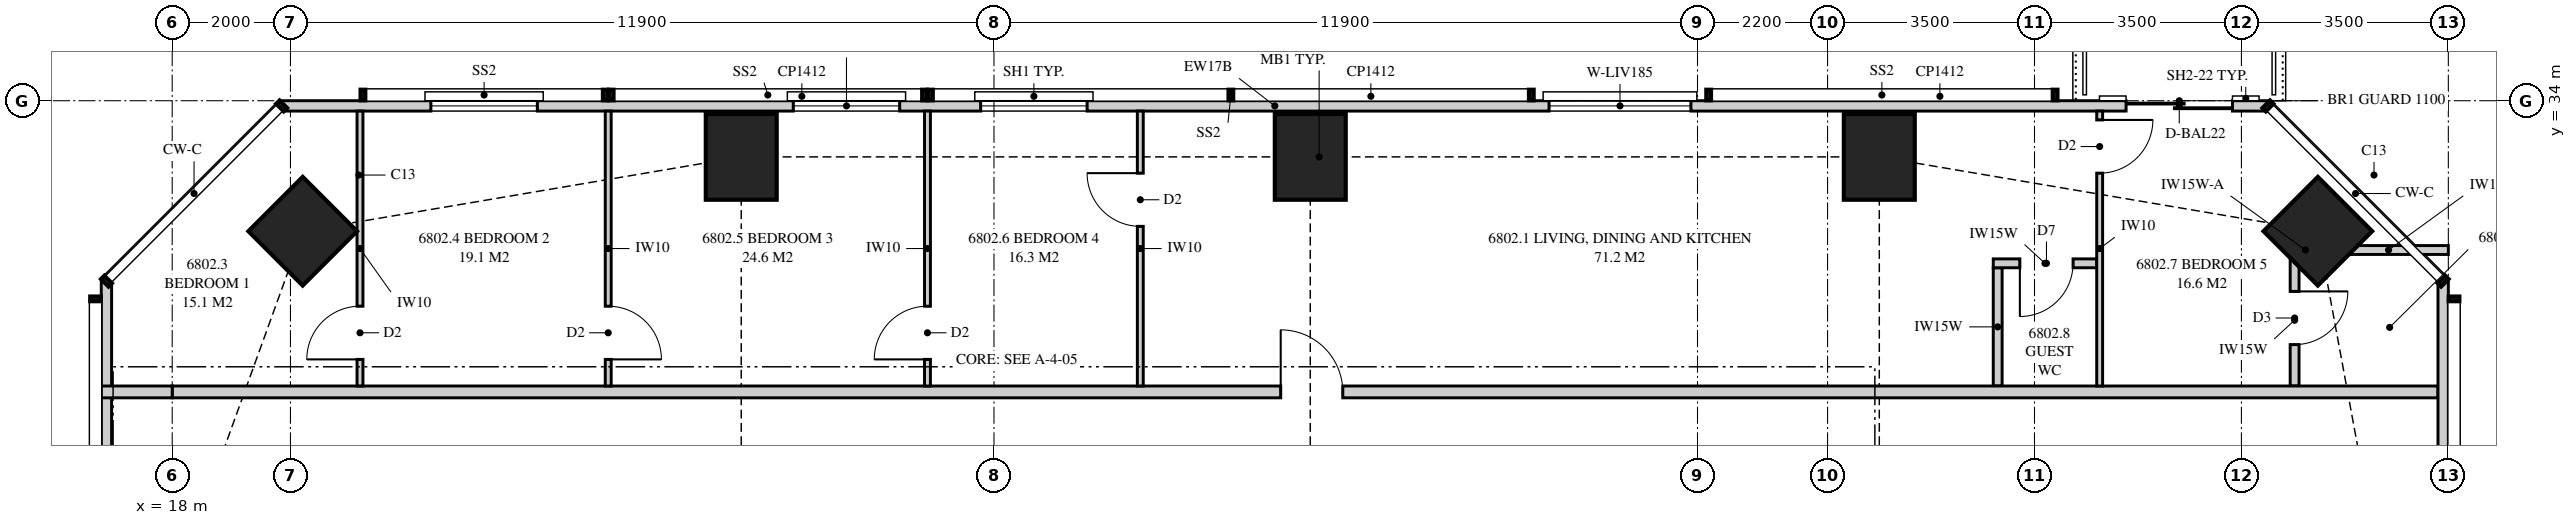
"""IFC4 building model, lengths in metres.
Left out: names, types, materials, properties, quantities, classifications, styles, units other than length and angle.
Written with IfcOpenShell. Run it as: python <this file> out.ifc"""

import sys

from ifc_helpers import new_model, si_unit, direction, frame, frame_2d, origin, origin_2d, place, context, subcontext, project, spatial, polyline, rectangle, outline, extrude, element, fill, save


model = new_model("IFC4")
c1 = context("Model", 3, precision=1e-05, world=origin(), true_north=direction((0.0, 1.0)))
c2 = subcontext(c1, "Body", "Model", "MODEL_VIEW")
j1 = project(units=[si_unit("LENGTHUNIT", "METRE"), si_unit("PLANEANGLEUNIT", "RADIAN")], contexts=[c1])
p1 = place(None, origin())
s1 = spatial("IfcSite", under=j1, at=p1, CompositionType="ELEMENT")
p2 = place(p1, origin())
s2 = spatial("IfcBuilding", under=s1, at=p2, CompositionType="ELEMENT")
p3 = place(p2, frame((0.0, 0.0, 249.45)))
s3 = spatial("IfcBuildingStorey", under=s2, at=p3, CompositionType="ELEMENT", Elevation=249.45)
p4 = place(p3, frame((54.293, 31.793, 0.0), z_axis=(0.0, 0.0, 1.0), x_axis=(0.707106781187, 0.707106781187, 0.0)))
e1 = element("IfcColumn", 1, at=p4, inside=s3, PredefinedType="COLUMN", context=c2, shape_type="SweptSolid", body=[
    extrude(rectangle(XDim=1.3, YDim=1.3, at=origin_2d()), origin(), (0.0, 0.0, 1.0), 3.5),
])
for number, where, z_axis, x_axis in (
    (2, (46.875, 33.05, 0.0), (0.0, 0.0, 1.0), (0.0, 1.0, 0.0)),
    (3, (37.25, 33.05, 0.0), (0.0, 0.0, 1.0), (0.0, 1.0, 0.0)),
    (4, (27.625, 33.05, 0.0), (0.0, 0.0, 1.0), (0.0, 1.0, 0.0)),
):
    element("IfcColumn", number, at=place(p3, frame(where, z_axis=z_axis, x_axis=x_axis)), inside=s3, PredefinedType="COLUMN", context=c2, shape_type="SweptSolid", body=[
        extrude(rectangle(XDim=1.45, YDim=1.2, at=origin_2d()), origin(), (0.0, 0.0, 1.0), 3.5),
    ])
p5 = place(p3, frame((20.207, 31.793, 0.0), z_axis=(0.0, 0.0, 1.0), x_axis=(0.707106781187, 0.707106781187, 0.0)))
e5 = element("IfcColumn", 5, at=p5, inside=s3, PredefinedType="COLUMN", context=c2, shape_type="SweptSolid", body=[
    extrude(rectangle(XDim=1.3, YDim=1.3, at=origin_2d()), origin(), (0.0, 0.0, 1.0), 3.5),
])
p6 = place(p3, frame((56.413, 3.051, 0.0), z_axis=(0.0, 0.0, 1.0), x_axis=(0.0, 1.0, 0.0)))
e6 = element("IfcWall", 6, at=p6, inside=s3, PredefinedType="SOLIDWALL", context=c2, shape_type="SweptSolid", body=[
    extrude(outline(polyline([(0.0, 0.0), (27.897, 0.0), (27.897, 3.26), (22.157, 3.26), (22.157, 2.3), (22.092, 2.3), (22.092, 3.26), (21.949, 3.26), (21.949, 2.3), (9.949, 2.3), (9.949, 3.26), (9.858, 3.26), (9.858, 2.3), (9.688, 2.3), (9.688, 3.26), (0.0, 3.26), (0.0, 0.0)])), frame((0.0, 0.087, 0.0), z_axis=(0.0, -1.0, 0.0), x_axis=(1.0, 0.0, 0.0)), (0.0, 0.0, 1.0), 0.175),
])
p7 = place(p6, frame((10.831, 0.0, 0.4)))
e7 = element("IfcOpeningElement", 7, at=p7, cuts=e6, PredefinedType="OPENING", context=c2, shape_type="SweptSolid", body=[
    extrude(rectangle(XDim=2.4, YDim=1.85, at=frame_2d((1.2, 0.925))), frame((0.0, 0.097, 0.0), z_axis=(0.0, -1.0, 0.0), x_axis=(1.0, 0.0, 0.0)), (0.0, 0.0, 1.0), 0.195),
])
p8 = place(p6, frame((15.074, 0.0, 0.0)))
e8 = element("IfcOpeningElement", 8, at=p8, cuts=e6, PredefinedType="OPENING", context=c2, shape_type="SweptSolid", body=[
    extrude(rectangle(XDim=1.8, YDim=2.25, at=frame_2d((0.9, 1.125))), frame((0.0, 0.097, 0.0), z_axis=(0.0, -1.0, 0.0), x_axis=(1.0, 0.0, 0.0)), (0.0, 0.0, 1.0), 0.195),
])
p9 = place(p6, frame((18.699, 0.0, 0.4)))
e9 = element("IfcOpeningElement", 9, at=p9, cuts=e6, PredefinedType="OPENING", context=c2, shape_type="SweptSolid", body=[
    extrude(rectangle(XDim=2.4, YDim=1.85, at=frame_2d((1.2, 0.925))), frame((0.0, 0.097, 0.0), z_axis=(0.0, -1.0, 0.0), x_axis=(1.0, 0.0, 0.0)), (0.0, 0.0, 1.0), 0.195),
])
p10 = place(p3, frame((53.449, 33.913, 0.0), z_axis=(0.0, 0.0, 1.0), x_axis=(-1.0, 0.0, 0.0)))
e10 = element("IfcWall", 10, at=p10, inside=s3, PredefinedType="SOLIDWALL", context=c2, shape_type="SweptSolid", body=[
    extrude(outline(polyline([(0.0, 0.0), (33.597, 0.0), (33.597, 3.26), (26.039, 3.26), (26.039, 2.3), (25.955, 2.3), (25.955, 3.26), (25.824, 3.26), (25.824, 2.3), (6.574, 2.3), (6.574, 3.26), (6.442, 3.26), (6.442, 2.3), (6.359, 2.3), (6.359, 3.26), (0.0, 3.26), (0.0, 0.0)])), frame((0.0, 0.087, 0.0), z_axis=(0.0, -1.0, 0.0), x_axis=(1.0, 0.0, 0.0)), (0.0, 0.0, 1.0), 0.175),
])
p11 = place(p10, frame((0.6, 0.0, 0.0)))
e11 = element("IfcOpeningElement", 11, at=p11, cuts=e10, PredefinedType="OPENING", context=c2, shape_type="SweptSolid", body=[
    extrude(rectangle(XDim=1.8, YDim=2.25, at=frame_2d((0.9, 1.125))), frame((0.0, 0.097, 0.0), z_axis=(0.0, -1.0, 0.0), x_axis=(1.0, 0.0, 0.0)), (0.0, 0.0, 1.0), 0.195),
])
p12 = place(p10, frame((9.76, 0.0, 0.4)))
e12 = element("IfcOpeningElement", 12, at=p12, cuts=e10, PredefinedType="OPENING", context=c2, shape_type="SweptSolid", body=[
    extrude(rectangle(XDim=2.4, YDim=1.85, at=frame_2d((1.2, 0.925))), frame((0.0, 0.097, 0.0), z_axis=(0.0, -1.0, 0.0), x_axis=(1.0, 0.0, 0.0)), (0.0, 0.0, 1.0), 0.195),
])
p13 = place(p10, frame((19.974, 0.0, 0.4)))
e13 = element("IfcOpeningElement", 13, at=p13, cuts=e10, PredefinedType="OPENING", context=c2, shape_type="SweptSolid", body=[
    extrude(rectangle(XDim=1.8, YDim=1.85, at=frame_2d((0.9, 0.925))), frame((0.0, 0.097, 0.0), z_axis=(0.0, -1.0, 0.0), x_axis=(1.0, 0.0, 0.0)), (0.0, 0.0, 1.0), 0.195),
])
p14 = place(p10, frame((23.144, 0.0, 0.4)))
e14 = element("IfcOpeningElement", 14, at=p14, cuts=e10, PredefinedType="OPENING", context=c2, shape_type="SweptSolid", body=[
    extrude(rectangle(XDim=1.8, YDim=1.85, at=frame_2d((0.9, 0.925))), frame((0.0, 0.097, 0.0), z_axis=(0.0, -1.0, 0.0), x_axis=(1.0, 0.0, 0.0)), (0.0, 0.0, 1.0), 0.195),
])
p15 = place(p10, frame((29.273, 0.0, 0.4)))
e15 = element("IfcOpeningElement", 15, at=p15, cuts=e10, PredefinedType="OPENING", context=c2, shape_type="SweptSolid", body=[
    extrude(rectangle(XDim=1.8, YDim=1.85, at=frame_2d((0.9, 0.925))), frame((0.0, 0.097, 0.0), z_axis=(0.0, -1.0, 0.0), x_axis=(1.0, 0.0, 0.0)), (0.0, 0.0, 1.0), 0.195),
])
p16 = place(p3, frame((16.887, 30.949, 0.0), z_axis=(0.0, 0.0, 1.0), x_axis=(0.0, -1.0, 0.0)))
e16 = element("IfcWall", 16, at=p16, inside=s3, PredefinedType="SOLIDWALL", context=c2, shape_type="SweptSolid", body=[
    extrude(outline(polyline([(0.0, 0.0), (27.897, 0.0), (27.897, 3.26), (18.148, 3.26), (18.148, 2.3), (18.125, 2.3), (18.125, 3.26), (17.949, 3.26), (17.949, 2.3), (5.949, 2.3), (5.949, 3.26), (0.0, 3.26), (0.0, 0.0)])), frame((0.0, 0.087, 0.0), z_axis=(0.0, -1.0, 0.0), x_axis=(1.0, 0.0, 0.0)), (0.0, 0.0, 1.0), 0.175),
])
p17 = place(p16, frame((11.849, 0.0, 0.4)))
e17 = element("IfcOpeningElement", 17, at=p17, cuts=e16, PredefinedType="OPENING", context=c2, shape_type="SweptSolid", body=[
    extrude(rectangle(XDim=1.2, YDim=1.85, at=frame_2d((0.6, 0.925))), frame((0.0, 0.097, 0.0), z_axis=(0.0, -1.0, 0.0), x_axis=(1.0, 0.0, 0.0)), (0.0, 0.0, 1.0), 0.195),
])
p18 = place(p3, frame((18.0, 29.075, 0.0), z_axis=(0.0, 0.0, 1.0), x_axis=(1.0, 0.0, 0.0)))
e18 = element("IfcWall", 18, at=p18, inside=s3, PredefinedType="PARTITIONING", context=c2, shape_type="SweptSolid", body=[
    extrude(outline(polyline([(0.0, 0.0), (38.325, 0.0), (38.325, 3.26), (37.721, 3.26), (37.721, 2.3), (35.87, 2.3), (35.87, 3.26), (30.185, 3.26), (30.185, 2.66), (27.565, 2.66), (27.565, 3.26), (20.56, 3.26), (20.56, 2.66), (17.94, 2.66), (17.94, 3.26), (10.935, 3.26), (10.935, 2.66), (8.315, 2.66), (8.315, 3.26), (2.192, 3.26), (2.192, 2.3), (0.256, 2.3), (0.256, 3.26), (0.0, 3.26), (0.0, 0.0)])), frame((0.0, 0.1, 0.0), z_axis=(0.0, -1.0, 0.0), x_axis=(1.0, 0.0, 0.0)), (0.0, 0.0, 1.0), 0.2),
])
p19 = place(p18, frame((18.75, 0.0, 0.0)))
e19 = element("IfcOpeningElement", 19, at=p19, cuts=e18, PredefinedType="OPENING", context=c2, shape_type="SweptSolid", body=[
    extrude(rectangle(XDim=1.05, YDim=2.2, at=frame_2d((0.525, 1.1))), frame((0.0, 0.11, 0.0), z_axis=(0.0, -1.0, 0.0), x_axis=(1.0, 0.0, 0.0)), (0.0, 0.0, 1.0), 0.22),
])
p20 = place(p3, frame((53.975, 31.475, 0.0), z_axis=(0.0, 0.0, 1.0), x_axis=(1.0, 0.0, 0.0)))
e20 = element("IfcWall", 20, at=p20, inside=s3, PredefinedType="PLUMBINGWALL", context=c2, shape_type="SweptSolid", body=[
    extrude(rectangle(XDim=0.217, YDim=0.15, at=frame_2d((0.108, 0.0))), origin(), (0.0, 0.0, 1.0), 2.3),
])
p21 = place(p3, frame((54.478, 31.475, 0.0), z_axis=(0.0, 0.0, 1.0), x_axis=(1.0, 0.0, 0.0)))
e21 = element("IfcWall", 21, at=p21, inside=s3, PredefinedType="PLUMBINGWALL", context=c2, shape_type="SweptSolid", body=[
    extrude(outline(polyline([(0.774, 3.26), (0.774, 2.3), (0.325, 2.3), (0.0, 1.15), (0.325, 0.0), (2.022, 0.0), (2.022, 3.26), (0.774, 3.26)])), frame((0.0, 0.075, 0.0), z_axis=(0.0, -1.0, 0.0), x_axis=(1.0, 0.0, 0.0)), (0.0, 0.0, 1.0), 0.15),
])
p22 = place(p3, frame((53.9, 31.4, 0.0), z_axis=(0.0, 0.0, 1.0), x_axis=(0.0, -1.0, 0.0)))
e22 = element("IfcWall", 22, at=p22, inside=s3, PredefinedType="PLUMBINGWALL", context=c2, shape_type="SweptSolid", body=[
    extrude(outline(polyline([(0.0, 0.0), (2.225, 0.0), (2.225, 3.26), (2.225, 2.3), (0.438, 2.3), (0.0, 2.3), (0.0, 3.26), (0.0, 0.0)])), frame((0.0, 0.075, 0.0), z_axis=(0.0, -1.0, 0.0), x_axis=(1.0, 0.0, 0.0)), (0.0, 0.0, 1.0), 0.15),
])
p23 = place(p22, frame((0.625, 0.0, 0.0)))
e23 = element("IfcOpeningElement", 23, at=p23, cuts=e22, PredefinedType="OPENING", context=c2, shape_type="SweptSolid", body=[
    extrude(rectangle(XDim=0.9, YDim=2.1, at=frame_2d((0.45, 1.05))), frame((0.0, 0.085, 0.0), z_axis=(0.0, -1.0, 0.0), x_axis=(1.0, 0.0, 0.0)), (0.0, 0.0, 1.0), 0.17),
])
p24 = place(p3, frame((21.176, 33.825, 0.0), z_axis=(0.0, 0.0, 1.0), x_axis=(0.0, -1.0, 0.0)))
e24 = element("IfcWall", 24, at=p24, inside=s3, PredefinedType="PARTITIONING", context=c2, shape_type="SweptSolid", body=[
    extrude(outline(polyline([(0.0, 0.0), (4.65, 0.0), (4.65, 3.26), (2.74, 3.26), (2.74, 2.3), (0.996, 2.3), (0.996, 3.26), (0.0, 3.26), (0.0, 0.0)])), frame((0.0, 0.05, 0.0), z_axis=(0.0, -1.0, 0.0), x_axis=(1.0, 0.0, 0.0)), (0.0, 0.0, 1.0), 0.1),
])
p25 = place(p24, frame((3.3, 0.0, 0.0)))
e25 = element("IfcOpeningElement", 25, at=p25, cuts=e24, PredefinedType="OPENING", context=c2, shape_type="SweptSolid", body=[
    extrude(rectangle(XDim=0.9, YDim=2.1, at=frame_2d((0.45, 1.05))), frame((0.0, 0.06, 0.0), z_axis=(0.0, -1.0, 0.0), x_axis=(1.0, 0.0, 0.0)), (0.0, 0.0, 1.0), 0.12),
])
p26 = place(p3, frame((25.375, 33.825, 0.0), z_axis=(0.0, 0.0, 1.0), x_axis=(0.0, -1.0, 0.0)))
e26 = element("IfcWall", 26, at=p26, inside=s3, PredefinedType="PARTITIONING", context=c2, shape_type="SweptSolid", body=[
    extrude(outline(polyline([(0.0, 0.0), (4.65, 0.0), (4.65, 3.26), (2.029, 3.26), (2.029, 2.3), (0.284, 2.3), (0.284, 3.26), (0.0, 3.26), (0.0, 0.0)])), frame((0.0, 0.05, 0.0), z_axis=(0.0, -1.0, 0.0), x_axis=(1.0, 0.0, 0.0)), (0.0, 0.0, 1.0), 0.1),
])
p27 = place(p26, frame((3.3, 0.0, 0.0)))
e27 = element("IfcOpeningElement", 27, at=p27, cuts=e26, PredefinedType="OPENING", context=c2, shape_type="SweptSolid", body=[
    extrude(rectangle(XDim=0.9, YDim=2.1, at=frame_2d((0.45, 1.05))), frame((0.0, 0.06, 0.0), z_axis=(0.0, -1.0, 0.0), x_axis=(1.0, 0.0, 0.0)), (0.0, 0.0, 1.0), 0.12),
])
p28 = place(p3, frame((30.775, 33.825, 0.0), z_axis=(0.0, 0.0, 1.0), x_axis=(0.0, -1.0, 0.0)))
e28 = element("IfcWall", 28, at=p28, inside=s3, PredefinedType="PARTITIONING", context=c2, shape_type="SweptSolid", body=[
    extrude(outline(polyline([(0.0, 0.0), (4.65, 0.0), (4.65, 3.26), (1.635, 3.26), (1.635, 2.3), (0.0, 2.3), (0.0, 3.26), (0.0, 0.0)])), frame((0.0, 0.05, 0.0), z_axis=(0.0, -1.0, 0.0), x_axis=(1.0, 0.0, 0.0)), (0.0, 0.0, 1.0), 0.1),
])
p29 = place(p28, frame((3.3, 0.0, 0.0)))
e29 = element("IfcOpeningElement", 29, at=p29, cuts=e28, PredefinedType="OPENING", context=c2, shape_type="SweptSolid", body=[
    extrude(rectangle(XDim=0.9, YDim=2.1, at=frame_2d((0.45, 1.05))), frame((0.0, 0.06, 0.0), z_axis=(0.0, -1.0, 0.0), x_axis=(1.0, 0.0, 0.0)), (0.0, 0.0, 1.0), 0.12),
])
p30 = place(p3, frame((34.375, 33.825, 0.0), z_axis=(0.0, 0.0, 1.0), x_axis=(0.0, -1.0, 0.0)))
e30 = element("IfcWall", 30, at=p30, inside=s3, PredefinedType="PARTITIONING", context=c2, shape_type="SweptSolid", body=[
    extrude(outline(polyline([(0.0, 0.0), (4.65, 0.0), (4.65, 3.26), (1.635, 3.26), (1.635, 2.3), (0.0, 2.3), (0.0, 3.26), (0.0, 0.0)])), frame((0.0, 0.05, 0.0), z_axis=(0.0, -1.0, 0.0), x_axis=(1.0, 0.0, 0.0)), (0.0, 0.0, 1.0), 0.1),
])
p31 = place(p30, frame((1.05, 0.0, 0.0)))
e31 = element("IfcOpeningElement", 31, at=p31, cuts=e30, PredefinedType="OPENING", context=c2, shape_type="SweptSolid", body=[
    extrude(rectangle(XDim=0.9, YDim=2.1, at=frame_2d((0.45, 1.05))), frame((0.0, 0.06, 0.0), z_axis=(0.0, -1.0, 0.0), x_axis=(1.0, 0.0, 0.0)), (0.0, 0.0, 1.0), 0.12),
])
p32 = place(p3, frame((50.603, 33.825, 0.0), z_axis=(0.0, 0.0, 1.0), x_axis=(0.0, -1.0, 0.0)))
e32 = element("IfcWall", 32, at=p32, inside=s3, PredefinedType="PARTITIONING", context=c2, shape_type="SweptSolid", body=[
    extrude(outline(polyline([(0.0, 0.0), (4.65, 0.0), (4.65, 3.26), (2.279, 3.26), (2.279, 2.3), (0.534, 2.3), (0.534, 3.26), (0.0, 3.26), (0.0, 0.0)])), frame((0.0, 0.05, 0.0), z_axis=(0.0, -1.0, 0.0), x_axis=(1.0, 0.0, 0.0)), (0.0, 0.0, 1.0), 0.1),
])
p33 = place(p32, frame((0.15, 0.0, 0.0)))
e33 = element("IfcOpeningElement", 33, at=p33, cuts=e32, PredefinedType="OPENING", context=c2, shape_type="SweptSolid", body=[
    extrude(rectangle(XDim=0.9, YDim=2.1, at=frame_2d((0.45, 1.05))), frame((0.0, 0.06, 0.0), z_axis=(0.0, -1.0, 0.0), x_axis=(1.0, 0.0, 0.0)), (0.0, 0.0, 1.0), 0.12),
])
p34 = place(p3, frame((16.8, 29.075, 0.0), z_axis=(0.0, 0.0, 1.0), x_axis=(1.0, 0.0, 0.0)))
e34 = element("IfcWall", 34, at=p34, inside=s3, PredefinedType="PARTITIONING", context=c2, shape_type="SweptSolid", body=[
    extrude(rectangle(XDim=1.2, YDim=0.2, at=frame_2d((0.6, 0.0))), origin(), (0.0, 0.0, 1.0), 3.26),
])
p35 = place(p3, frame((50.552, 31.25, 0.0), z_axis=(0.0, 0.0, 1.0), x_axis=(-1.0, 0.0, 0.0)))
e35 = element("IfcWall", 35, at=p35, inside=s3, PredefinedType="PLUMBINGWALL", context=c2, shape_type="SweptSolid", body=[
    extrude(rectangle(XDim=1.75, YDim=0.15, at=frame_2d((0.875, 0.0))), origin(), (0.0, 0.0, 1.0), 3.26),
])
p36 = place(p35, frame((0.4, 0.0, 0.0)))
e36 = element("IfcOpeningElement", 36, at=p36, cuts=e35, PredefinedType="OPENING", context=c2, shape_type="SweptSolid", body=[
    extrude(rectangle(XDim=0.9, YDim=2.1, at=frame_2d((0.45, 1.05))), frame((0.0, 0.085, 0.0), z_axis=(0.0, -1.0, 0.0), x_axis=(1.0, 0.0, 0.0)), (0.0, 0.0, 1.0), 0.17),
])
p37 = place(p3, frame((48.877, 29.175, 0.0), z_axis=(0.0, 0.0, 1.0), x_axis=(0.0, 1.0, 0.0)))
e37 = element("IfcWall", 37, at=p37, inside=s3, PredefinedType="PLUMBINGWALL", context=c2, shape_type="SweptSolid", body=[
    extrude(rectangle(XDim=2.0, YDim=0.15, at=frame_2d((1.0, 0.0))), origin(), (0.0, 0.0, 1.0), 3.26),
])
p38 = place(p11, origin())
e38 = element("IfcDoor", 38, at=p38, inside=s3, OperationType="SLIDING_TO_LEFT", PredefinedType="DOOR", context=c2, shape_type="SweptSolid", body=[
    extrude(rectangle(XDim=1.8, YDim=2.25, at=frame_2d((0.9, 1.125))), frame((0.0, 0.025, 0.0), z_axis=(0.0, -1.0, 0.0), x_axis=(1.0, 0.0, 0.0)), (0.0, 0.0, 1.0), 0.05),
])
fill(e11, e38)
p39 = place(p12, origin())
e39 = element("IfcWindow", 39, at=p39, inside=s3, PartitioningType="SINGLE_PANEL", PredefinedType="WINDOW", context=c2, shape_type="SweptSolid", body=[
    extrude(rectangle(XDim=2.4, YDim=1.85, at=frame_2d((1.2, 0.925))), frame((0.0, 0.03, 0.0), z_axis=(0.0, -1.0, 0.0), x_axis=(1.0, 0.0, 0.0)), (0.0, 0.0, 1.0), 0.06),
])
fill(e12, e39)
p40 = place(p13, origin())
e40 = element("IfcWindow", 40, at=p40, inside=s3, PartitioningType="SINGLE_PANEL", PredefinedType="WINDOW", context=c2, shape_type="SweptSolid", body=[
    extrude(rectangle(XDim=1.8, YDim=1.85, at=frame_2d((0.9, 0.925))), frame((0.0, 0.03, 0.0), z_axis=(0.0, -1.0, 0.0), x_axis=(1.0, 0.0, 0.0)), (0.0, 0.0, 1.0), 0.06),
])
fill(e13, e40)
p41 = place(p14, origin())
e41 = element("IfcWindow", 41, at=p41, inside=s3, PartitioningType="SINGLE_PANEL", PredefinedType="WINDOW", context=c2, shape_type="SweptSolid", body=[
    extrude(rectangle(XDim=1.8, YDim=1.85, at=frame_2d((0.9, 0.925))), frame((0.0, 0.03, 0.0), z_axis=(0.0, -1.0, 0.0), x_axis=(1.0, 0.0, 0.0)), (0.0, 0.0, 1.0), 0.06),
])
fill(e14, e41)
p42 = place(p15, origin())
e42 = element("IfcWindow", 42, at=p42, inside=s3, PartitioningType="SINGLE_PANEL", PredefinedType="WINDOW", context=c2, shape_type="SweptSolid", body=[
    extrude(rectangle(XDim=1.8, YDim=1.85, at=frame_2d((0.9, 0.925))), frame((0.0, 0.03, 0.0), z_axis=(0.0, -1.0, 0.0), x_axis=(1.0, 0.0, 0.0)), (0.0, 0.0, 1.0), 0.06),
])
fill(e15, e42)
p43 = place(p19, origin())
e43 = element("IfcDoor", 43, at=p43, inside=s3, OperationType="SINGLE_SWING_LEFT", PredefinedType="DOOR", context=c2, shape_type="SweptSolid", body=[
    extrude(rectangle(XDim=1.05, YDim=2.2, at=frame_2d((0.525, 1.1))), frame((0.0, 0.025, 0.0), z_axis=(0.0, -1.0, 0.0), x_axis=(1.0, 0.0, 0.0)), (0.0, 0.0, 1.0), 0.05),
])
fill(e19, e43)
p44 = place(p23, origin())
e44 = element("IfcDoor", 44, at=p44, inside=s3, OperationType="SINGLE_SWING_LEFT", PredefinedType="DOOR", context=c2, shape_type="SweptSolid", body=[
    extrude(rectangle(XDim=0.9, YDim=2.1, at=frame_2d((0.45, 1.05))), frame((0.0, 0.025, 0.0), z_axis=(0.0, -1.0, 0.0), x_axis=(1.0, 0.0, 0.0)), (0.0, 0.0, 1.0), 0.05),
])
fill(e23, e44)
p45 = place(p25, frame((0.9, 0.0, 0.0), z_axis=(0.0, 0.0, 1.0), x_axis=(-1.0, 0.0, 0.0)))
e45 = element("IfcDoor", 45, at=p45, inside=s3, OperationType="SINGLE_SWING_LEFT", PredefinedType="DOOR", context=c2, shape_type="SweptSolid", body=[
    extrude(rectangle(XDim=0.9, YDim=2.1, at=frame_2d((0.45, 1.05))), frame((0.0, 0.025, 0.0), z_axis=(0.0, -1.0, 0.0), x_axis=(1.0, 0.0, 0.0)), (0.0, 0.0, 1.0), 0.05),
])
fill(e25, e45)
p46 = place(p27, origin())
e46 = element("IfcDoor", 46, at=p46, inside=s3, OperationType="SINGLE_SWING_RIGHT", PredefinedType="DOOR", context=c2, shape_type="SweptSolid", body=[
    extrude(rectangle(XDim=0.9, YDim=2.1, at=frame_2d((0.45, 1.05))), frame((0.0, 0.025, 0.0), z_axis=(0.0, -1.0, 0.0), x_axis=(1.0, 0.0, 0.0)), (0.0, 0.0, 1.0), 0.05),
])
fill(e27, e46)
p47 = place(p29, frame((0.9, 0.0, 0.0), z_axis=(0.0, 0.0, 1.0), x_axis=(-1.0, 0.0, 0.0)))
e47 = element("IfcDoor", 47, at=p47, inside=s3, OperationType="SINGLE_SWING_LEFT", PredefinedType="DOOR", context=c2, shape_type="SweptSolid", body=[
    extrude(rectangle(XDim=0.9, YDim=2.1, at=frame_2d((0.45, 1.05))), frame((0.0, 0.025, 0.0), z_axis=(0.0, -1.0, 0.0), x_axis=(1.0, 0.0, 0.0)), (0.0, 0.0, 1.0), 0.05),
])
fill(e29, e47)
p48 = place(p31, frame((0.9, 0.0, 0.0), z_axis=(0.0, 0.0, 1.0), x_axis=(-1.0, 0.0, 0.0)))
e48 = element("IfcDoor", 48, at=p48, inside=s3, OperationType="SINGLE_SWING_RIGHT", PredefinedType="DOOR", context=c2, shape_type="SweptSolid", body=[
    extrude(rectangle(XDim=0.9, YDim=2.1, at=frame_2d((0.45, 1.05))), frame((0.0, 0.025, 0.0), z_axis=(0.0, -1.0, 0.0), x_axis=(1.0, 0.0, 0.0)), (0.0, 0.0, 1.0), 0.05),
])
fill(e31, e48)
p49 = place(p33, origin())
e49 = element("IfcDoor", 49, at=p49, inside=s3, OperationType="SINGLE_SWING_LEFT", PredefinedType="DOOR", context=c2, shape_type="SweptSolid", body=[
    extrude(rectangle(XDim=0.9, YDim=2.1, at=frame_2d((0.45, 1.05))), frame((0.0, 0.025, 0.0), z_axis=(0.0, -1.0, 0.0), x_axis=(1.0, 0.0, 0.0)), (0.0, 0.0, 1.0), 0.05),
])
fill(e33, e49)
p50 = place(p36, origin())
e50 = element("IfcDoor", 50, at=p50, inside=s3, OperationType="SINGLE_SWING_RIGHT", PredefinedType="DOOR", context=c2, shape_type="SweptSolid", body=[
    extrude(rectangle(XDim=0.9, YDim=2.1, at=frame_2d((0.45, 1.05))), frame((0.0, 0.025, 0.0), z_axis=(0.0, -1.0, 0.0), x_axis=(1.0, 0.0, 0.0)), (0.0, 0.0, 1.0), 0.05),
])
fill(e36, e50)
save(model, sys.argv[1])
